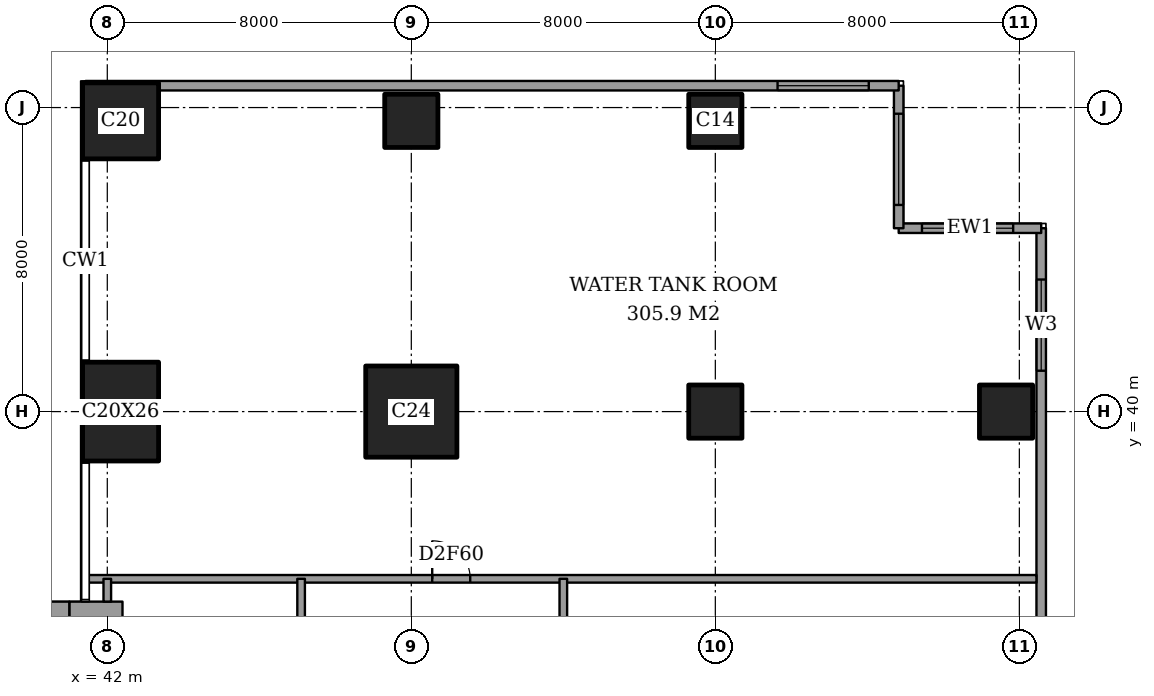
"""IFC4 building model, lengths in metres.
Left out: names, types, materials, properties, quantities, classifications, styles, units other than length and angle.
Written with IfcOpenShell. Run it as: python <this file> out.ifc"""

import sys

from ifc_helpers import new_model, si_unit, direction, frame, frame_2d, origin, origin_2d, place, context, subcontext, project, spatial, rectangle, extrude, element, fill, save


model = new_model("IFC4")
c1 = context("Model", 3, precision=1e-05, world=origin(), true_north=direction((0.0, 1.0)))
c2 = subcontext(c1, "Body", "Model", "MODEL_VIEW")
j1 = project(units=[si_unit("LENGTHUNIT", "METRE"), si_unit("PLANEANGLEUNIT", "RADIAN")], contexts=[c1])
p1 = place(None, origin())
s1 = spatial("IfcSite", under=j1, at=p1, CompositionType="ELEMENT")
p2 = place(p1, origin())
s2 = spatial("IfcBuilding", under=s1, at=p2, CompositionType="ELEMENT")
p3 = place(p2, frame((0.0, 0.0, 291.6)))
s3 = spatial("IfcBuildingStorey", under=s2, at=p3, CompositionType="ELEMENT", Elevation=291.6)
p4 = place(p3, frame((42.35, 40.0, 0.0), z_axis=(0.0, 0.0, 1.0), x_axis=(1.0, 0.0, 0.0)))
e1 = element("IfcColumn", 1, at=p4, inside=s3, PredefinedType="COLUMN", context=c2, shape_type="SweptSolid", body=[
    extrude(rectangle(XDim=2.0, YDim=2.6, at=origin_2d()), origin(), (0.0, 0.0, 1.0), 5.0),
])
p5 = place(p3, frame((42.35, 47.65, 0.0), z_axis=(0.0, 0.0, 1.0), x_axis=(1.0, 0.0, 0.0)))
e2 = element("IfcColumn", 2, at=p5, inside=s3, PredefinedType="COLUMN", context=c2, shape_type="SweptSolid", body=[
    extrude(rectangle(XDim=2.0, YDim=2.0, at=origin_2d()), origin(), (0.0, 0.0, 1.0), 5.0),
])
p6 = place(p3, frame((50.0, 40.0, 0.0), z_axis=(0.0, 0.0, 1.0), x_axis=(1.0, 0.0, 0.0)))
e3 = element("IfcColumn", 3, at=p6, inside=s3, PredefinedType="COLUMN", context=c2, shape_type="SweptSolid", body=[
    extrude(rectangle(XDim=2.4, YDim=2.4, at=origin_2d()), origin(), (0.0, 0.0, 1.0), 5.0),
])
for number, where, z_axis, x_axis in (
    (4, (50.0, 47.65, 0.0), (0.0, 0.0, 1.0), (1.0, 0.0, 0.0)),
    (5, (58.0, 40.0, 0.0), (0.0, 0.0, 1.0), (1.0, 0.0, 0.0)),
    (6, (58.0, 47.65, 0.0), (0.0, 0.0, 1.0), (1.0, 0.0, 0.0)),
    (7, (65.65, 40.0, 0.0), (0.0, 0.0, 1.0), (1.0, 0.0, 0.0)),
):
    element("IfcColumn", number, at=place(p3, frame(where, z_axis=z_axis, x_axis=x_axis)), inside=s3, PredefinedType="COLUMN", context=c2, shape_type="SweptSolid", body=[
        extrude(rectangle(XDim=1.4, YDim=1.4, at=origin_2d()), origin(), (0.0, 0.0, 1.0), 5.0),
    ])
p7 = place(p3, frame((37.85, 34.0, 0.0), z_axis=(0.0, 0.0, 1.0), x_axis=(1.0, 0.0, 0.0)))
e8 = element("IfcWall", 8, at=p7, inside=s3, PredefinedType="SHEAR", context=c2, shape_type="SweptSolid", body=[
    extrude(rectangle(XDim=3.15, YDim=2.0, at=frame_2d((1.575, 0.0))), origin(), (0.0, 0.0, 1.0), 5.0),
])
p8 = place(p3, frame((41.7, 24.85, 0.0), z_axis=(0.0, 0.0, 1.0), x_axis=(0.0, 1.0, 0.0)))
e9 = element("IfcWall", 9, at=p8, inside=s3, PredefinedType="SHEAR", context=c2, shape_type="SweptSolid", body=[
    extrude(rectangle(XDim=10.15, YDim=1.4, at=frame_2d((5.075, 0.0))), origin(), (0.0, 0.0, 1.0), 5.0),
])
p9 = place(p3, frame((66.575, 3.175, 0.0), z_axis=(0.0, 0.0, 1.0), x_axis=(0.0, 1.0, 0.0)))
e10 = element("IfcWall", 10, at=p9, inside=s3, PredefinedType="SOLIDWALL", context=c2, shape_type="SweptSolid", body=[
    extrude(rectangle(XDim=41.65, YDim=0.25, at=frame_2d((20.825, 0.0))), origin(), (0.0, 0.0, 1.0), 5.0),
])
p10 = place(p9, frame((1.35, 0.0, 0.6)))
e11 = element("IfcOpeningElement", 11, at=p10, cuts=e10, PredefinedType="OPENING", context=c2, shape_type="SweptSolid", body=[
    extrude(rectangle(XDim=2.4, YDim=3.0, at=frame_2d((1.2, 1.5))), frame((0.0, 0.135, 0.0), z_axis=(0.0, -1.0, 0.0), x_axis=(1.0, 0.0, 0.0)), (0.0, 0.0, 1.0), 0.27),
])
p11 = place(p9, frame((19.625, 0.0, 0.6)))
e12 = element("IfcOpeningElement", 12, at=p11, cuts=e10, PredefinedType="OPENING", context=c2, shape_type="SweptSolid", body=[
    extrude(rectangle(XDim=2.4, YDim=3.0, at=frame_2d((1.2, 1.5))), frame((0.0, 0.135, 0.0), z_axis=(0.0, -1.0, 0.0), x_axis=(1.0, 0.0, 0.0)), (0.0, 0.0, 1.0), 0.27),
])
p12 = place(p9, frame((37.9, 0.0, 0.6)))
e13 = element("IfcOpeningElement", 13, at=p12, cuts=e10, PredefinedType="OPENING", context=c2, shape_type="SweptSolid", body=[
    extrude(rectangle(XDim=2.4, YDim=3.0, at=frame_2d((1.2, 1.5))), frame((0.0, 0.135, 0.0), z_axis=(0.0, -1.0, 0.0), x_axis=(1.0, 0.0, 0.0)), (0.0, 0.0, 1.0), 0.27),
])
p13 = place(p3, frame((66.575, 44.825, 0.0), z_axis=(0.0, 0.0, 1.0), x_axis=(-1.0, 0.0, 0.0)))
e14 = element("IfcWall", 14, at=p13, inside=s3, PredefinedType="SOLIDWALL", context=c2, shape_type="SweptSolid", body=[
    extrude(rectangle(XDim=3.75, YDim=0.25, at=frame_2d((1.875, 0.0))), origin(), (0.0, 0.0, 1.0), 5.0),
])
p14 = place(p13, frame((0.738, 0.0, 0.6)))
e15 = element("IfcOpeningElement", 15, at=p14, cuts=e14, PredefinedType="OPENING", context=c2, shape_type="SweptSolid", body=[
    extrude(rectangle(XDim=2.4, YDim=3.0, at=frame_2d((1.2, 1.5))), frame((0.0, 0.135, 0.0), z_axis=(0.0, -1.0, 0.0), x_axis=(1.0, 0.0, 0.0)), (0.0, 0.0, 1.0), 0.27),
])
p15 = place(p3, frame((62.825, 44.825, 0.0), z_axis=(0.0, 0.0, 1.0), x_axis=(0.0, 1.0, 0.0)))
e16 = element("IfcWall", 16, at=p15, inside=s3, PredefinedType="SOLIDWALL", context=c2, shape_type="SweptSolid", body=[
    extrude(rectangle(XDim=3.75, YDim=0.25, at=frame_2d((1.875, 0.0))), origin(), (0.0, 0.0, 1.0), 5.0),
])
p16 = place(p15, frame((0.613, 0.0, 0.6)))
e17 = element("IfcOpeningElement", 17, at=p16, cuts=e16, PredefinedType="OPENING", context=c2, shape_type="SweptSolid", body=[
    extrude(rectangle(XDim=2.4, YDim=3.0, at=frame_2d((1.2, 1.5))), frame((0.0, 0.135, 0.0), z_axis=(0.0, -1.0, 0.0), x_axis=(1.0, 0.0, 0.0)), (0.0, 0.0, 1.0), 0.27),
])
p17 = place(p3, frame((62.825, 48.575, 0.0), z_axis=(0.0, 0.0, 1.0), x_axis=(-1.0, 0.0, 0.0)))
e18 = element("IfcWall", 18, at=p17, inside=s3, PredefinedType="SOLIDWALL", context=c2, shape_type="SweptSolid", body=[
    extrude(rectangle(XDim=21.4, YDim=0.25, at=frame_2d((10.7, 0.0))), origin(), (0.0, 0.0, 1.0), 5.0),
])
p18 = place(p17, frame((0.788, 0.0, 0.6)))
e19 = element("IfcOpeningElement", 19, at=p18, cuts=e18, PredefinedType="OPENING", context=c2, shape_type="SweptSolid", body=[
    extrude(rectangle(XDim=2.4, YDim=3.0, at=frame_2d((1.2, 1.5))), frame((0.0, 0.135, 0.0), z_axis=(0.0, -1.0, 0.0), x_axis=(1.0, 0.0, 0.0)), (0.0, 0.0, 1.0), 0.27),
])
p19 = place(p3, frame((41.439, 35.6, 0.0), z_axis=(0.0, 0.0, 1.0), x_axis=(1.0, 0.0, 0.0)))
e20 = element("IfcWall", 20, at=p19, inside=s3, PredefinedType="PARTITIONING", context=c2, shape_type="SweptSolid", body=[
    extrude(rectangle(XDim=25.011, YDim=0.2, at=frame_2d((12.505, 0.0))), origin(), (0.0, 0.0, 1.0), 4.7),
])
p20 = place(p19, frame((9.111, 0.0, 0.0)))
e21 = element("IfcOpeningElement", 21, at=p20, cuts=e20, PredefinedType="OPENING", context=c2, shape_type="SweptSolid", body=[
    extrude(rectangle(XDim=1.0, YDim=2.1, at=frame_2d((0.5, 1.05))), frame((0.0, 0.11, 0.0), z_axis=(0.0, -1.0, 0.0), x_axis=(1.0, 0.0, 0.0)), (0.0, 0.0, 1.0), 0.22),
])
p21 = place(p3, frame((42.0, 35.0, 0.0), z_axis=(0.0, 0.0, 1.0), x_axis=(0.0, 1.0, 0.0)))
e22 = element("IfcWall", 22, at=p21, inside=s3, PredefinedType="PARTITIONING", context=c2, shape_type="SweptSolid", body=[
    extrude(rectangle(XDim=0.6, YDim=0.2, at=frame_2d((0.3, 0.0))), origin(), (0.0, 0.0, 1.0), 4.7),
])
p22 = place(p3, frame((47.1, 28.0, 0.0), z_axis=(0.0, 0.0, 1.0), x_axis=(0.0, 1.0, 0.0)))
e23 = element("IfcWall", 23, at=p22, inside=s3, PredefinedType="PARTITIONING", context=c2, shape_type="SweptSolid", body=[
    extrude(rectangle(XDim=7.6, YDim=0.2, at=frame_2d((3.8, 0.0))), origin(), (0.0, 0.0, 1.0), 4.7),
])
p23 = place(p22, frame((1.0, 0.0, 0.0)))
e24 = element("IfcOpeningElement", 24, at=p23, cuts=e23, PredefinedType="OPENING", context=c2, shape_type="SweptSolid", body=[
    extrude(rectangle(XDim=1.0, YDim=2.1, at=frame_2d((0.5, 1.05))), frame((0.0, 0.11, 0.0), z_axis=(0.0, -1.0, 0.0), x_axis=(1.0, 0.0, 0.0)), (0.0, 0.0, 1.0), 0.22),
])
p24 = place(p22, frame((4.8, 0.0, 0.0)))
e25 = element("IfcOpeningElement", 25, at=p24, cuts=e23, PredefinedType="OPENING", context=c2, shape_type="SweptSolid", body=[
    extrude(rectangle(XDim=1.0, YDim=2.1, at=frame_2d((0.5, 1.05))), frame((0.0, 0.11, 0.0), z_axis=(0.0, -1.0, 0.0), x_axis=(1.0, 0.0, 0.0)), (0.0, 0.0, 1.0), 0.22),
])
p25 = place(p3, frame((54.0, 12.4, 0.0), z_axis=(0.0, 0.0, 1.0), x_axis=(0.0, 1.0, 0.0)))
e26 = element("IfcWall", 26, at=p25, inside=s3, PredefinedType="PARTITIONING", context=c2, shape_type="SweptSolid", body=[
    extrude(rectangle(XDim=23.2, YDim=0.2, at=frame_2d((11.6, 0.0))), origin(), (0.0, 0.0, 1.0), 4.7),
])
p26 = place(p25, frame((11.1, 0.0, 0.0)))
e27 = element("IfcOpeningElement", 27, at=p26, cuts=e26, PredefinedType="OPENING", context=c2, shape_type="SweptSolid", body=[
    extrude(rectangle(XDim=1.0, YDim=2.1, at=frame_2d((0.5, 1.05))), frame((0.0, 0.11, 0.0), z_axis=(0.0, -1.0, 0.0), x_axis=(1.0, 0.0, 0.0)), (0.0, 0.0, 1.0), 0.22),
])
p27 = place(p12, origin())
e28 = element("IfcWindow", 28, at=p27, inside=s3, PartitioningType="SINGLE_PANEL", PredefinedType="WINDOW", context=c2, shape_type="SweptSolid", body=[
    extrude(rectangle(XDim=2.4, YDim=3.0, at=frame_2d((1.2, 1.5))), frame((0.0, 0.03, 0.0), z_axis=(0.0, -1.0, 0.0), x_axis=(1.0, 0.0, 0.0)), (0.0, 0.0, 1.0), 0.06),
])
fill(e13, e28)
p28 = place(p14, origin())
e29 = element("IfcWindow", 29, at=p28, inside=s3, PartitioningType="SINGLE_PANEL", PredefinedType="WINDOW", context=c2, shape_type="SweptSolid", body=[
    extrude(rectangle(XDim=2.4, YDim=3.0, at=frame_2d((1.2, 1.5))), frame((0.0, 0.03, 0.0), z_axis=(0.0, -1.0, 0.0), x_axis=(1.0, 0.0, 0.0)), (0.0, 0.0, 1.0), 0.06),
])
fill(e15, e29)
p29 = place(p16, origin())
e30 = element("IfcWindow", 30, at=p29, inside=s3, PartitioningType="SINGLE_PANEL", PredefinedType="WINDOW", context=c2, shape_type="SweptSolid", body=[
    extrude(rectangle(XDim=2.4, YDim=3.0, at=frame_2d((1.2, 1.5))), frame((0.0, 0.03, 0.0), z_axis=(0.0, -1.0, 0.0), x_axis=(1.0, 0.0, 0.0)), (0.0, 0.0, 1.0), 0.06),
])
fill(e17, e30)
p30 = place(p18, origin())
e31 = element("IfcWindow", 31, at=p30, inside=s3, PartitioningType="SINGLE_PANEL", PredefinedType="WINDOW", context=c2, shape_type="SweptSolid", body=[
    extrude(rectangle(XDim=2.4, YDim=3.0, at=frame_2d((1.2, 1.5))), frame((0.0, 0.03, 0.0), z_axis=(0.0, -1.0, 0.0), x_axis=(1.0, 0.0, 0.0)), (0.0, 0.0, 1.0), 0.06),
])
fill(e19, e31)
p31 = place(p20, origin())
e32 = element("IfcDoor", 32, at=p31, inside=s3, OperationType="SINGLE_SWING_RIGHT", PredefinedType="DOOR", context=c2, shape_type="SweptSolid", body=[
    extrude(rectangle(XDim=1.0, YDim=2.1, at=frame_2d((0.5, 1.05))), frame((0.0, 0.025, 0.0), z_axis=(0.0, -1.0, 0.0), x_axis=(1.0, 0.0, 0.0)), (0.0, 0.0, 1.0), 0.05),
])
fill(e21, e32)
save(model, sys.argv[1])
